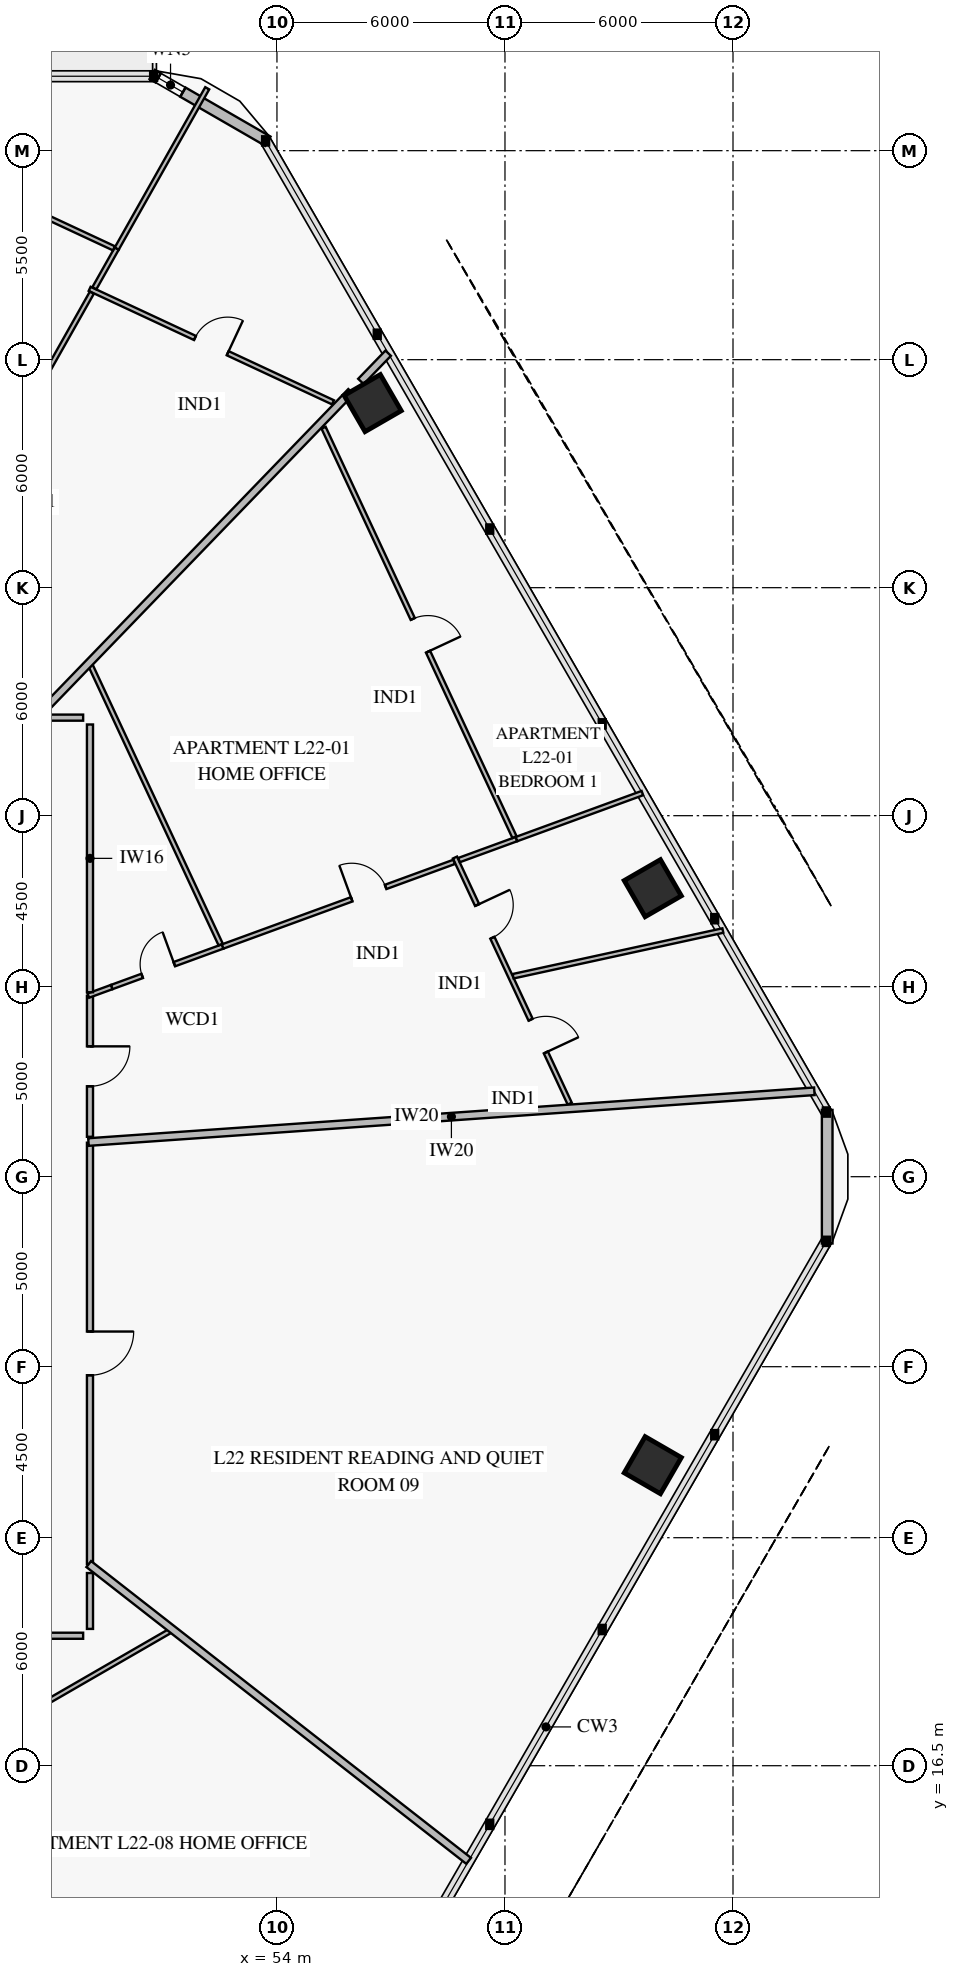
"""IFC4 building model, lengths in metres.
Left out: names, types, materials, properties, quantities, classifications, styles, units other than length and angle.
Written with IfcOpenShell. Run it as: python <this file> out.ifc"""

import sys

from ifc_helpers import new_model, si_unit, direction, frame, frame_2d, origin, origin_2d, place, context, subcontext, project, spatial, rectangle, extrude, element, fill, save


model = new_model("IFC4")
c1 = context("Model", 3, precision=1e-05, world=origin(), true_north=direction((0.0, 1.0)))
c2 = subcontext(c1, "Body", "Model", "MODEL_VIEW")
j1 = project(units=[si_unit("LENGTHUNIT", "METRE"), si_unit("PLANEANGLEUNIT", "RADIAN")], contexts=[c1])
p1 = place(None, origin())
s1 = spatial("IfcSite", under=j1, at=p1, CompositionType="ELEMENT")
p2 = place(p1, origin())
s2 = spatial("IfcBuilding", under=s1, at=p2, CompositionType="ELEMENT")
p3 = place(p2, frame((0.0, 0.0, 92.4)))
s3 = spatial("IfcBuildingStorey", under=s2, at=p3, CompositionType="ELEMENT", Elevation=92.4)
for number, where, z_axis, x_axis in (
    (1, (63.889, 39.592, 0.0), (0.0, 0.0, 1.0), (-0.5, 0.866, 0.0)),
    (2, (56.519, 52.357, 0.0), (0.0, 0.0, 1.0), (-0.5, 0.866, 0.0)),
    (3, (63.889, 24.408, 0.0), (0.0, 0.0, 1.0), (0.5, 0.866, 0.0)),
):
    element("IfcColumn", number, at=place(p3, frame(where, z_axis=z_axis, x_axis=x_axis)), inside=s3, PredefinedType="COLUMN", context=c2, shape_type="SweptSolid", body=[
        extrude(rectangle(XDim=1.1, YDim=1.1, at=origin_2d()), origin(), (0.0, 0.0, 1.0), 3.55),
    ])
p4 = place(p3, frame((50.717, 61.006, 0.0), z_axis=(0.0, 0.0, 1.0), x_axis=(0.866007452331, -0.500031091541, 0.0)))
e4 = element("IfcWall", 4, at=p4, inside=s3, PredefinedType="SOLIDWALL", context=c2, shape_type="SweptSolid", body=[
    extrude(rectangle(XDim=3.515, YDim=0.28, at=frame_2d((1.757, 0.0))), origin(), (0.0, 0.0, 1.0), 3.55),
])
p5 = place(p4, frame((0.182, 0.0, 0.85)))
e5 = element("IfcOpeningElement", 5, at=p5, cuts=e4, PredefinedType="OPENING", context=c2, shape_type="SweptSolid", body=[
    extrude(rectangle(XDim=0.75, YDim=1.5, at=frame_2d((0.375, 0.75))), frame((0.0, 0.152, 0.0), z_axis=(0.0, -1.0, 0.0), x_axis=(1.0, 0.0, 0.0)), (0.0, 0.0, 1.0), 0.304),
])
p6 = place(p3, frame((68.479, 33.758, 0.0), z_axis=(0.0, 0.0, 1.0), x_axis=(0.0, -1.0, 0.0)))
e6 = element("IfcWall", 6, at=p6, inside=s3, PredefinedType="SOLIDWALL", context=c2, shape_type="SweptSolid", body=[
    extrude(rectangle(XDim=3.515, YDim=0.28, at=frame_2d((1.758, 0.0))), origin(), (0.0, 0.0, 1.0), 3.55),
])
p7 = place(p3, frame((61.704, 33.923, 0.0), z_axis=(0.0, 0.0, 1.0), x_axis=(-0.42261048954, 0.906311411233, 0.0)))
e7 = element("IfcWall", 7, at=p7, inside=s3, PredefinedType="PARTITIONING", context=c2, shape_type="SweptSolid", body=[
    extrude(rectangle(XDim=7.146, YDim=0.12, at=frame_2d((3.573, 0.0))), origin(), (0.0, 0.0, 1.0), 2.85),
])
p8 = place(p7, frame((1.486, 0.0, 0.0)))
e8 = element("IfcOpeningElement", 8, at=p8, cuts=e7, PredefinedType="OPENING", context=c2, shape_type="SweptSolid", body=[
    extrude(rectangle(XDim=0.95, YDim=2.1, at=frame_2d((0.475, 1.05))), frame((0.0, 0.072, 0.0), z_axis=(0.0, -1.0, 0.0), x_axis=(1.0, 0.0, 0.0)), (0.0, 0.0, 1.0), 0.144),
])
p9 = place(p7, frame((4.816, 0.0, 0.0)))
e9 = element("IfcOpeningElement", 9, at=p9, cuts=e7, PredefinedType="OPENING", context=c2, shape_type="SweptSolid", body=[
    extrude(rectangle(XDim=0.95, YDim=2.1, at=frame_2d((0.475, 1.05))), frame((0.0, 0.072, 0.0), z_axis=(0.0, -1.0, 0.0), x_axis=(1.0, 0.0, 0.0)), (0.0, 0.0, 1.0), 0.144),
])
p10 = place(p3, frame((49.65, 36.99, 0.0), z_axis=(0.0, 0.0, 1.0), x_axis=(0.93920992581, 0.343343436314, 0.0)))
e10 = element("IfcWall", 10, at=p10, inside=s3, PredefinedType="PARTITIONING", context=c2, shape_type="SweptSolid", body=[
    extrude(rectangle(XDim=3.11, YDim=0.12, at=frame_2d((1.555, 0.0))), origin(), (0.0, 0.0, 1.0), 3.55),
])
p11 = place(p10, frame((0.856, 0.0, 0.0)))
e11 = element("IfcOpeningElement", 11, at=p11, cuts=e10, PredefinedType="OPENING", context=c2, shape_type="SweptSolid", body=[
    extrude(rectangle(XDim=0.9, YDim=2.1, at=frame_2d((0.45, 1.05))), frame((0.0, 0.072, 0.0), z_axis=(0.0, -1.0, 0.0), x_axis=(1.0, 0.0, 0.0)), (0.0, 0.0, 1.0), 0.144),
])
p12 = place(p3, frame((52.571, 38.058, 0.0), z_axis=(0.0, 0.0, 1.0), x_axis=(0.93922057819, 0.343314295515, 0.0)))
e12 = element("IfcWall", 12, at=p12, inside=s3, PredefinedType="PARTITIONING", context=c2, shape_type="SweptSolid", body=[
    extrude(rectangle(XDim=6.486, YDim=0.12, at=frame_2d((3.243, 0.0))), origin(), (0.0, 0.0, 1.0), 3.1),
])
p13 = place(p12, frame((3.616, 0.0, 0.0)))
e13 = element("IfcOpeningElement", 13, at=p13, cuts=e12, PredefinedType="OPENING", context=c2, shape_type="SweptSolid", body=[
    extrude(rectangle(XDim=0.95, YDim=2.1, at=frame_2d((0.475, 1.05))), frame((0.0, 0.072, 0.0), z_axis=(0.0, -1.0, 0.0), x_axis=(1.0, 0.0, 0.0)), (0.0, 0.0, 1.0), 0.144),
])
p14 = place(p3, frame((58.791, 40.331, 0.0), z_axis=(0.0, 0.0, 1.0), x_axis=(0.93917179076, 0.343447736114, 0.0)))
e14 = element("IfcWall", 14, at=p14, inside=s3, PredefinedType="PARTITIONING", context=c2, shape_type="SweptSolid", body=[
    extrude(rectangle(XDim=1.609, YDim=0.12, at=frame_2d((0.805, 0.0))), origin(), (0.0, 0.0, 1.0), 3.55),
])
p15 = place(p3, frame((60.25, 40.937, 0.0), z_axis=(0.0, 0.0, 1.0), x_axis=(-0.42261779654, 0.906308003963, 0.0)))
e15 = element("IfcWall", 15, at=p15, inside=s3, PredefinedType="PARTITIONING", context=c2, shape_type="SweptSolid", body=[
    extrude(rectangle(XDim=11.885, YDim=0.12, at=frame_2d((5.942, 0.0))), origin(), (0.0, 0.0, 1.0), 2.85),
])
p16 = place(p15, frame((5.383, 0.0, 0.0)))
e16 = element("IfcOpeningElement", 16, at=p16, cuts=e15, PredefinedType="OPENING", context=c2, shape_type="SweptSolid", body=[
    extrude(rectangle(XDim=0.95, YDim=2.1, at=frame_2d((0.475, 1.05))), frame((0.0, 0.072, 0.0), z_axis=(0.0, -1.0, 0.0), x_axis=(1.0, 0.0, 0.0)), (0.0, 0.0, 1.0), 0.144),
])
p17 = place(p3, frame((49.08, 33.05, 0.0), z_axis=(0.0, 0.0, 1.0), x_axis=(0.0, 1.0, 0.0)))
e17 = element("IfcWall", 17, at=p17, inside=s3, PredefinedType="PARTITIONING", context=c2, shape_type="SweptSolid", body=[
    extrude(rectangle(XDim=3.71, YDim=0.16, at=frame_2d((1.855, 0.0))), origin(), (0.0, 0.0, 1.0), 2.85),
])
p18 = place(p17, frame((1.33, 0.0, 0.0)))
e18 = element("IfcOpeningElement", 18, at=p18, cuts=e17, PredefinedType="OPENING", context=c2, shape_type="SweptSolid", body=[
    extrude(rectangle(XDim=1.05, YDim=2.15, at=frame_2d((0.525, 1.075))), frame((0.0, 0.092, 0.0), z_axis=(0.0, -1.0, 0.0), x_axis=(1.0, 0.0, 0.0)), (0.0, 0.0, 1.0), 0.184),
])
p19 = place(p3, frame((55.475, 52.377, 0.0), z_axis=(0.0, 0.0, 1.0), x_axis=(-0.906311093924, 0.422611170026, 0.0)))
e19 = element("IfcWall", 19, at=p19, inside=s3, PredefinedType="PARTITIONING", context=c2, shape_type="SweptSolid", body=[
    extrude(rectangle(XDim=7.066, YDim=0.12, at=frame_2d((3.533, 0.0))), origin(), (0.0, 0.0, 1.0), 3.55),
])
p20 = place(p19, frame((3.058, 0.0, 0.0)))
e20 = element("IfcOpeningElement", 20, at=p20, cuts=e19, PredefinedType="OPENING", context=c2, shape_type="SweptSolid", body=[
    extrude(rectangle(XDim=0.95, YDim=2.1, at=frame_2d((0.475, 1.05))), frame((0.0, 0.072, 0.0), z_axis=(0.0, -1.0, 0.0), x_axis=(1.0, 0.0, 0.0)), (0.0, 0.0, 1.0), 0.144),
])
p21 = place(p3, frame((44.204, 46.537, 0.0), z_axis=(0.0, 0.0, 1.0), x_axis=(0.491507930141, 0.870873099027, 0.0)))
e21 = element("IfcWall", 21, at=p21, inside=s3, PredefinedType="PARTITIONING", context=c2, shape_type="SweptSolid", body=[
    extrude(rectangle(XDim=10.019, YDim=0.12, at=frame_2d((5.009, 0.0))), origin(), (0.0, 0.0, 1.0), 3.1),
])
p22 = place(p21, frame((5.176, 0.0, 0.0)))
e22 = element("IfcOpeningElement", 22, at=p22, cuts=e21, PredefinedType="OPENING", context=c2, shape_type="SweptSolid", body=[
    extrude(rectangle(XDim=0.95, YDim=2.1, at=frame_2d((0.475, 1.05))), frame((0.0, 0.072, 0.0), z_axis=(0.0, -1.0, 0.0), x_axis=(1.0, 0.0, 0.0)), (0.0, 0.0, 1.0), 0.144),
])
p23 = place(p3, frame((49.196, 55.38, 0.0), z_axis=(0.0, 0.0, 1.0), x_axis=(0.491432242221, 0.870915811836, 0.0)))
e23 = element("IfcWall", 23, at=p23, inside=s3, PredefinedType="PARTITIONING", context=c2, shape_type="SweptSolid", body=[
    extrude(rectangle(XDim=1.197, YDim=0.12, at=frame_2d((0.599, 0.0))), origin(), (0.0, 0.0, 1.0), 2.8),
])
p24 = place(p3, frame((49.71, 56.43, 0.0), z_axis=(0.0, 0.0, 1.0), x_axis=(-0.906320781417, 0.422590394084, 0.0)))
e24 = element("IfcWall", 24, at=p24, inside=s3, PredefinedType="PARTITIONING", context=c2, shape_type="SweptSolid", body=[
    extrude(rectangle(XDim=6.976, YDim=0.12, at=frame_2d((3.488, 0.0))), origin(), (0.0, 0.0, 1.0), 2.8),
])
p25 = place(p24, frame((2.929, 0.0, 0.0)))
e25 = element("IfcOpeningElement", 25, at=p25, cuts=e24, PredefinedType="OPENING", context=c2, shape_type="SweptSolid", body=[
    extrude(rectangle(XDim=0.95, YDim=2.1, at=frame_2d((0.475, 1.05))), frame((0.0, 0.072, 0.0), z_axis=(0.0, -1.0, 0.0), x_axis=(1.0, 0.0, 0.0)), (0.0, 0.0, 1.0), 0.144),
])
p26 = place(p3, frame((49.08, 21.806, 0.0), z_axis=(0.0, 0.0, 1.0), x_axis=(0.0, 1.0, 0.0)))
e26 = element("IfcWall", 26, at=p26, inside=s3, PredefinedType="PARTITIONING", context=c2, shape_type="SweptSolid", body=[
    extrude(rectangle(XDim=11.088, YDim=0.16, at=frame_2d((5.544, 0.0))), origin(), (0.0, 0.0, 1.0), 2.85),
])
p27 = place(p26, frame((4.969, 0.0, 0.0)))
e27 = element("IfcOpeningElement", 27, at=p27, cuts=e26, PredefinedType="OPENING", context=c2, shape_type="SweptSolid", body=[
    extrude(rectangle(XDim=1.15, YDim=2.2, at=frame_2d((0.575, 1.1))), frame((0.0, 0.092, 0.0), z_axis=(0.0, -1.0, 0.0), x_axis=(1.0, 0.0, 0.0)), (0.0, 0.0, 1.0), 0.184),
])
p28 = place(p3, frame((49.04, 32.912, 0.0), z_axis=(0.0, 0.0, 1.0), x_axis=(0.99756386753, 0.069759086856, 0.0)))
e28 = element("IfcWall", 28, at=p28, inside=s3, PredefinedType="PARTITIONING", context=c2, shape_type="SweptSolid", body=[
    extrude(rectangle(XDim=19.147, YDim=0.2, at=frame_2d((9.574, 0.0))), origin(), (0.0, 0.0, 1.0), 2.8),
])
p29 = place(p3, frame((60.215, 37.275, 0.0), z_axis=(0.0, 0.0, 1.0), x_axis=(0.977079889422, 0.212872942592, 0.0)))
e29 = element("IfcWall", 29, at=p29, inside=s3, PredefinedType="PARTITIONING", context=c2, shape_type="SweptSolid", body=[
    extrude(rectangle(XDim=5.647, YDim=0.12, at=frame_2d((2.824, 0.0))), origin(), (0.0, 0.0, 1.0), 2.8),
])
p30 = place(p3, frame((49.037, 36.765, 0.0), z_axis=(0.0, 0.0, 1.0), x_axis=(0.939125794288, 0.343573489232, 0.0)))
e30 = element("IfcWall", 30, at=p30, inside=s3, PredefinedType="PARTITIONING", context=c2, shape_type="SweptSolid", body=[
    extrude(rectangle(XDim=0.653, YDim=0.12, at=frame_2d((0.327, 0.0))), origin(), (0.0, 0.0, 1.0), 3.55),
])
p31 = place(p3, frame((60.302, 40.884, 0.0), z_axis=(0.0, 0.0, 1.0), x_axis=(0.939220300938, 0.343315054005, 0.0)))
e31 = element("IfcWall", 31, at=p31, inside=s3, PredefinedType="PARTITIONING", context=c2, shape_type="SweptSolid", body=[
    extrude(rectangle(XDim=3.528, YDim=0.12, at=frame_2d((1.764, 0.0))), origin(), (0.0, 0.0, 1.0), 2.8),
])
p32 = place(p3, frame((52.519, 38.111, 0.0), z_axis=(0.0, 0.0, 1.0), x_axis=(-0.422610316209, 0.906311492057, 0.0)))
e32 = element("IfcWall", 32, at=p32, inside=s3, PredefinedType="PARTITIONING", context=c2, shape_type="SweptSolid", body=[
    extrude(rectangle(XDim=8.113, YDim=0.12, at=frame_2d((4.056, 0.0))), origin(), (0.0, 0.0, 1.0), 2.85),
])
p33 = place(p3, frame((47.627, 44.04, 0.0), z_axis=(0.0, 0.0, 1.0), x_axis=(0.694659610847, 0.719338602508, 0.0)))
e33 = element("IfcWall", 33, at=p33, inside=s3, PredefinedType="PARTITIONING", context=c2, shape_type="SweptSolid", body=[
    extrude(rectangle(XDim=11.98, YDim=0.2, at=frame_2d((5.99, 0.0))), origin(), (0.0, 0.0, 1.0), 2.8),
])
p34 = place(p3, frame((56.209, 52.927, 0.0), z_axis=(0.0, 0.0, 1.0), x_axis=(0.694716755503, 0.719283413977, 0.0)))
e34 = element("IfcWall", 34, at=p34, inside=s3, PredefinedType="PARTITIONING", context=c2, shape_type="SweptSolid", body=[
    extrude(rectangle(XDim=1.033, YDim=0.2, at=frame_2d((0.517, 0.0))), origin(), (0.0, 0.0, 1.0), 3.55),
])
p35 = place(p3, frame((49.784, 56.423, 0.0), z_axis=(0.0, 0.0, 1.0), x_axis=(0.491502522911, 0.870876150766, 0.0)))
e35 = element("IfcWall", 35, at=p35, inside=s3, PredefinedType="PARTITIONING", context=c2, shape_type="SweptSolid", body=[
    extrude(rectangle(XDim=4.844, YDim=0.12, at=frame_2d((2.422, 0.0))), origin(), (0.0, 0.0, 1.0), 3.55),
])
p36 = place(p3, frame((43.629, 15.682, 0.0), z_axis=(0.0, 0.0, 1.0), x_axis=(0.866026296779, 0.499998453285, 0.0)))
e36 = element("IfcWall", 36, at=p36, inside=s3, PredefinedType="PARTITIONING", context=c2, shape_type="SweptSolid", body=[
    extrude(rectangle(XDim=8.729, YDim=0.12, at=frame_2d((4.365, 0.0))), origin(), (0.0, 0.0, 1.0), 2.85),
])
p37 = place(p3, frame((49.047, 21.806, 0.0), z_axis=(0.0, 0.0, 1.0), x_axis=(0.788008325787, -0.61566458278, 0.0)))
e37 = element("IfcWall", 37, at=p37, inside=s3, PredefinedType="PARTITIONING", context=c2, shape_type="SweptSolid", body=[
    extrude(rectangle(XDim=12.686, YDim=0.2, at=frame_2d((6.343, 0.0))), origin(), (0.0, 0.0, 1.0), 2.8),
])
p38 = place(p3, frame((49.08, 36.854, 0.0), z_axis=(0.0, 0.0, 1.0), x_axis=(0.0, 1.0, 0.0)))
e38 = element("IfcWall", 38, at=p38, inside=s3, PredefinedType="PARTITIONING", context=c2, shape_type="SweptSolid", body=[
    extrude(rectangle(XDim=7.046, YDim=0.16, at=frame_2d((3.523, 0.0))), origin(), (0.0, 0.0, 1.0), 3.55),
])
p39 = place(p3, frame((48.9, 44.08, 0.0), z_axis=(0.0, 0.0, 1.0), x_axis=(-1.0, 0.0, 0.0)))
e39 = element("IfcWall", 39, at=p39, inside=s3, PredefinedType="PARTITIONING", context=c2, shape_type="SweptSolid", body=[
    extrude(rectangle(XDim=1.001, YDim=0.16, at=frame_2d((0.5, 0.0))), origin(), (0.0, 0.0, 1.0), 2.85),
])
p40 = place(p3, frame((41.667, 19.92, 0.0), z_axis=(0.0, 0.0, 1.0), x_axis=(1.0, 0.0, 0.0)))
e40 = element("IfcWall", 40, at=p40, inside=s3, PredefinedType="PARTITIONING", context=c2, shape_type="SweptSolid", body=[
    extrude(rectangle(XDim=7.233, YDim=0.16, at=frame_2d((3.616, 0.0))), origin(), (0.0, 0.0, 1.0), 2.85),
])
p41 = place(p3, frame((49.08, 20.1, 0.0), z_axis=(0.0, 0.0, 1.0), x_axis=(0.0, 1.0, 0.0)))
e41 = element("IfcWall", 41, at=p41, inside=s3, PredefinedType="PARTITIONING", context=c2, shape_type="SweptSolid", body=[
    extrude(rectangle(XDim=1.47, YDim=0.16, at=frame_2d((0.735, 0.0))), origin(), (0.0, 0.0, 1.0), 3.55),
])
p42 = place(p5, origin())
e42 = element("IfcWindow", 42, at=p42, inside=s3, PartitioningType="SINGLE_PANEL", PredefinedType="WINDOW", context=c2, shape_type="SweptSolid", body=[
    extrude(rectangle(XDim=0.75, YDim=1.5, at=frame_2d((0.375, 0.75))), frame((0.0, 0.03, 0.0), z_axis=(0.0, -1.0, 0.0), x_axis=(1.0, 0.0, 0.0)), (0.0, 0.0, 1.0), 0.06),
])
fill(e5, e42)
p43 = place(p8, frame((0.95, 0.0, 0.0), z_axis=(0.0, 0.0, 1.0), x_axis=(-1.0, 0.0, 0.0)))
e43 = element("IfcDoor", 43, at=p43, inside=s3, OperationType="SINGLE_SWING_RIGHT", PredefinedType="DOOR", context=c2, shape_type="SweptSolid", body=[
    extrude(rectangle(XDim=0.95, YDim=2.1, at=frame_2d((0.475, 1.05))), frame((0.0, 0.025, 0.0), z_axis=(0.0, -1.0, 0.0), x_axis=(1.0, 0.0, 0.0)), (0.0, 0.0, 1.0), 0.05),
])
fill(e8, e43)
p44 = place(p9, frame((0.95, 0.0, 0.0), z_axis=(0.0, 0.0, 1.0), x_axis=(-1.0, 0.0, 0.0)))
e44 = element("IfcDoor", 44, at=p44, inside=s3, OperationType="SINGLE_SWING_LEFT", PredefinedType="DOOR", context=c2, shape_type="SweptSolid", body=[
    extrude(rectangle(XDim=0.95, YDim=2.1, at=frame_2d((0.475, 1.05))), frame((0.0, 0.025, 0.0), z_axis=(0.0, -1.0, 0.0), x_axis=(1.0, 0.0, 0.0)), (0.0, 0.0, 1.0), 0.05),
])
fill(e9, e44)
p45 = place(p11, origin())
e45 = element("IfcDoor", 45, at=p45, inside=s3, OperationType="SINGLE_SWING_RIGHT", PredefinedType="DOOR", context=c2, shape_type="SweptSolid", body=[
    extrude(rectangle(XDim=0.9, YDim=2.1, at=frame_2d((0.45, 1.05))), frame((0.0, 0.025, 0.0), z_axis=(0.0, -1.0, 0.0), x_axis=(1.0, 0.0, 0.0)), (0.0, 0.0, 1.0), 0.05),
])
fill(e11, e45)
p46 = place(p13, origin())
e46 = element("IfcDoor", 46, at=p46, inside=s3, OperationType="SINGLE_SWING_LEFT", PredefinedType="DOOR", context=c2, shape_type="SweptSolid", body=[
    extrude(rectangle(XDim=0.95, YDim=2.1, at=frame_2d((0.475, 1.05))), frame((0.0, 0.025, 0.0), z_axis=(0.0, -1.0, 0.0), x_axis=(1.0, 0.0, 0.0)), (0.0, 0.0, 1.0), 0.05),
])
fill(e13, e46)
p47 = place(p16, frame((0.95, 0.0, 0.0), z_axis=(0.0, 0.0, 1.0), x_axis=(-1.0, 0.0, 0.0)))
e47 = element("IfcDoor", 47, at=p47, inside=s3, OperationType="SINGLE_SWING_RIGHT", PredefinedType="DOOR", context=c2, shape_type="SweptSolid", body=[
    extrude(rectangle(XDim=0.95, YDim=2.1, at=frame_2d((0.475, 1.05))), frame((0.0, 0.025, 0.0), z_axis=(0.0, -1.0, 0.0), x_axis=(1.0, 0.0, 0.0)), (0.0, 0.0, 1.0), 0.05),
])
fill(e16, e47)
p48 = place(p18, frame((1.05, 0.0, 0.0), z_axis=(0.0, 0.0, 1.0), x_axis=(-1.0, 0.0, 0.0)))
e48 = element("IfcDoor", 48, at=p48, inside=s3, OperationType="SINGLE_SWING_LEFT", PredefinedType="DOOR", context=c2, shape_type="SweptSolid", body=[
    extrude(rectangle(XDim=1.05, YDim=2.15, at=frame_2d((0.525, 1.075))), frame((0.0, 0.025, 0.0), z_axis=(0.0, -1.0, 0.0), x_axis=(1.0, 0.0, 0.0)), (0.0, 0.0, 1.0), 0.05),
])
fill(e18, e48)
p49 = place(p20, frame((0.95, 0.0, 0.0), z_axis=(0.0, 0.0, 1.0), x_axis=(-1.0, 0.0, 0.0)))
e49 = element("IfcDoor", 49, at=p49, inside=s3, OperationType="SINGLE_SWING_RIGHT", PredefinedType="DOOR", context=c2, shape_type="SweptSolid", body=[
    extrude(rectangle(XDim=0.95, YDim=2.1, at=frame_2d((0.475, 1.05))), frame((0.0, 0.025, 0.0), z_axis=(0.0, -1.0, 0.0), x_axis=(1.0, 0.0, 0.0)), (0.0, 0.0, 1.0), 0.05),
])
fill(e20, e49)
p50 = place(p27, frame((1.15, 0.0, 0.0), z_axis=(0.0, 0.0, 1.0), x_axis=(-1.0, 0.0, 0.0)))
e50 = element("IfcDoor", 50, at=p50, inside=s3, OperationType="SINGLE_SWING_LEFT", PredefinedType="DOOR", context=c2, shape_type="SweptSolid", body=[
    extrude(rectangle(XDim=1.15, YDim=2.2, at=frame_2d((0.575, 1.1))), frame((0.0, 0.025, 0.0), z_axis=(0.0, -1.0, 0.0), x_axis=(1.0, 0.0, 0.0)), (0.0, 0.0, 1.0), 0.05),
])
fill(e27, e50)
save(model, sys.argv[1])
